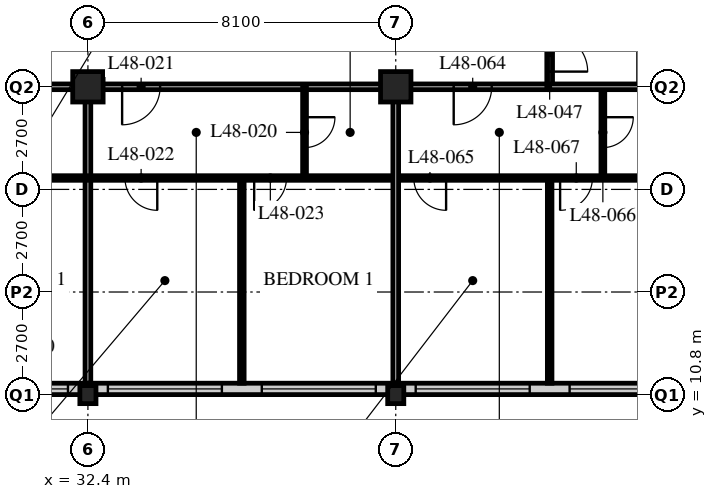
"""IFC4 building model, lengths in metres.
Left out: names, types, materials, properties, quantities, classifications, styles, units other than length and angle.
Written with IfcOpenShell. Run it as: python <this file> out.ifc"""

import sys

from ifc_helpers import new_model, si_unit, direction, frame, frame_2d, origin, origin_2d, place, context, subcontext, project, spatial, rectangle, hollow_rectangle, i_section, extrude, element, fill, save


model = new_model("IFC4")
c1 = context("Model", 3, precision=1e-05, world=origin(), true_north=direction((0.0, 1.0)))
c2 = subcontext(c1, "Body", "Model", "MODEL_VIEW")
j1 = project(units=[si_unit("LENGTHUNIT", "METRE"), si_unit("PLANEANGLEUNIT", "RADIAN")], contexts=[c1])
p1 = place(None, origin())
s1 = spatial("IfcSite", under=j1, at=p1, CompositionType="ELEMENT")
p2 = place(p1, origin())
s2 = spatial("IfcBuilding", under=s1, at=p2, CompositionType="ELEMENT")
p3 = place(p2, frame((0.0, 0.0, 188.4)))
s3 = spatial("IfcBuildingStorey", under=s2, at=p3, CompositionType="ELEMENT", Elevation=188.4)
p4 = place(p3, frame((32.4, 10.8, 0.0), z_axis=(0.0, 0.0, 1.0), x_axis=(1.0, 0.0, 0.0)))
e1 = element("IfcColumn", 1, at=p4, inside=s3, PredefinedType="COLUMN", context=c2, shape_type="SweptSolid", body=[
    extrude(i_section(OverallWidth=0.424, OverallDepth=0.475, WebThickness=0.048, FlangeThickness=0.077, FilletRadius=0.015, at=origin_2d()), origin(), (0.0, 0.0, 1.0), 3.6),
])
p5 = place(p3, frame((32.4, 18.9, 0.0), z_axis=(0.0, 0.0, 1.0), x_axis=(1.0, 0.0, 0.0)))
e2 = element("IfcColumn", 2, at=p5, inside=s3, PredefinedType="COLUMN", context=c2, shape_type="SweptSolid", body=[
    extrude(hollow_rectangle(XDim=0.8, YDim=0.8, WallThickness=0.08, at=origin_2d()), origin(), (0.0, 0.0, 1.0), 3.6),
])
p6 = place(p3, frame((40.5, 10.8, 0.0), z_axis=(0.0, 0.0, 1.0), x_axis=(1.0, 0.0, 0.0)))
e3 = element("IfcColumn", 3, at=p6, inside=s3, PredefinedType="COLUMN", context=c2, shape_type="SweptSolid", body=[
    extrude(i_section(OverallWidth=0.424, OverallDepth=0.475, WebThickness=0.048, FlangeThickness=0.077, FilletRadius=0.015, at=origin_2d()), origin(), (0.0, 0.0, 1.0), 3.6),
])
p7 = place(p3, frame((40.5, 18.9, 0.0), z_axis=(0.0, 0.0, 1.0), x_axis=(1.0, 0.0, 0.0)))
e4 = element("IfcColumn", 4, at=p7, inside=s3, PredefinedType="COLUMN", context=c2, shape_type="SweptSolid", body=[
    extrude(hollow_rectangle(XDim=0.8, YDim=0.8, WallThickness=0.08, at=origin_2d()), origin(), (0.0, 0.0, 1.0), 3.6),
])
p8 = place(p3, frame((8.4, 10.95, 0.0), z_axis=(0.0, 0.0, 1.0), x_axis=(1.0, 0.0, 0.0)))
e5 = element("IfcWall", 5, at=p8, inside=s3, PredefinedType="SOLIDWALL", context=c2, shape_type="SweptSolid", body=[
    extrude(rectangle(XDim=40.2, YDim=0.3, at=frame_2d((20.1, 0.0))), origin(), (0.0, 0.0, 1.0), 3.39),
])
p9 = place(p8, frame((0.225, 0.0, 0.6)))
e6 = element("IfcOpeningElement", 6, at=p9, cuts=e5, PredefinedType="OPENING", context=c2, shape_type="SweptSolid", body=[
    extrude(rectangle(XDim=3.0, YDim=2.4, at=frame_2d((1.5, 1.2))), frame((0.0, 0.16, 0.0), z_axis=(0.0, -1.0, 0.0), x_axis=(1.0, 0.0, 0.0)), (0.0, 0.0, 1.0), 0.32),
])
p10 = place(p8, frame((4.275, 0.0, 0.6)))
e7 = element("IfcOpeningElement", 7, at=p10, cuts=e5, PredefinedType="OPENING", context=c2, shape_type="SweptSolid", body=[
    extrude(rectangle(XDim=3.0, YDim=2.4, at=frame_2d((1.5, 1.2))), frame((0.0, 0.16, 0.0), z_axis=(0.0, -1.0, 0.0), x_axis=(1.0, 0.0, 0.0)), (0.0, 0.0, 1.0), 0.32),
])
p11 = place(p8, frame((8.325, 0.0, 0.6)))
e8 = element("IfcOpeningElement", 8, at=p11, cuts=e5, PredefinedType="OPENING", context=c2, shape_type="SweptSolid", body=[
    extrude(rectangle(XDim=3.0, YDim=2.4, at=frame_2d((1.5, 1.2))), frame((0.0, 0.16, 0.0), z_axis=(0.0, -1.0, 0.0), x_axis=(1.0, 0.0, 0.0)), (0.0, 0.0, 1.0), 0.32),
])
p12 = place(p8, frame((12.375, 0.0, 0.6)))
e9 = element("IfcOpeningElement", 9, at=p12, cuts=e5, PredefinedType="OPENING", context=c2, shape_type="SweptSolid", body=[
    extrude(rectangle(XDim=3.0, YDim=2.4, at=frame_2d((1.5, 1.2))), frame((0.0, 0.16, 0.0), z_axis=(0.0, -1.0, 0.0), x_axis=(1.0, 0.0, 0.0)), (0.0, 0.0, 1.0), 0.32),
])
p13 = place(p8, frame((16.425, 0.0, 0.6)))
e10 = element("IfcOpeningElement", 10, at=p13, cuts=e5, PredefinedType="OPENING", context=c2, shape_type="SweptSolid", body=[
    extrude(rectangle(XDim=3.0, YDim=2.4, at=frame_2d((1.5, 1.2))), frame((0.0, 0.16, 0.0), z_axis=(0.0, -1.0, 0.0), x_axis=(1.0, 0.0, 0.0)), (0.0, 0.0, 1.0), 0.32),
])
p14 = place(p8, frame((20.475, 0.0, 0.6)))
e11 = element("IfcOpeningElement", 11, at=p14, cuts=e5, PredefinedType="OPENING", context=c2, shape_type="SweptSolid", body=[
    extrude(rectangle(XDim=3.0, YDim=2.4, at=frame_2d((1.5, 1.2))), frame((0.0, 0.16, 0.0), z_axis=(0.0, -1.0, 0.0), x_axis=(1.0, 0.0, 0.0)), (0.0, 0.0, 1.0), 0.32),
])
p15 = place(p8, frame((24.525, 0.0, 0.6)))
e12 = element("IfcOpeningElement", 12, at=p15, cuts=e5, PredefinedType="OPENING", context=c2, shape_type="SweptSolid", body=[
    extrude(rectangle(XDim=3.0, YDim=2.4, at=frame_2d((1.5, 1.2))), frame((0.0, 0.16, 0.0), z_axis=(0.0, -1.0, 0.0), x_axis=(1.0, 0.0, 0.0)), (0.0, 0.0, 1.0), 0.32),
])
p16 = place(p8, frame((28.575, 0.0, 0.6)))
e13 = element("IfcOpeningElement", 13, at=p16, cuts=e5, PredefinedType="OPENING", context=c2, shape_type="SweptSolid", body=[
    extrude(rectangle(XDim=3.0, YDim=2.4, at=frame_2d((1.5, 1.2))), frame((0.0, 0.16, 0.0), z_axis=(0.0, -1.0, 0.0), x_axis=(1.0, 0.0, 0.0)), (0.0, 0.0, 1.0), 0.32),
])
p17 = place(p8, frame((32.625, 0.0, 0.6)))
e14 = element("IfcOpeningElement", 14, at=p17, cuts=e5, PredefinedType="OPENING", context=c2, shape_type="SweptSolid", body=[
    extrude(rectangle(XDim=3.0, YDim=2.4, at=frame_2d((1.5, 1.2))), frame((0.0, 0.16, 0.0), z_axis=(0.0, -1.0, 0.0), x_axis=(1.0, 0.0, 0.0)), (0.0, 0.0, 1.0), 0.32),
])
p18 = place(p8, frame((36.675, 0.0, 0.6)))
e15 = element("IfcOpeningElement", 15, at=p18, cuts=e5, PredefinedType="OPENING", context=c2, shape_type="SweptSolid", body=[
    extrude(rectangle(XDim=3.0, YDim=2.4, at=frame_2d((1.5, 1.2))), frame((0.0, 0.16, 0.0), z_axis=(0.0, -1.0, 0.0), x_axis=(1.0, 0.0, 0.0)), (0.0, 0.0, 1.0), 0.32),
])
p19 = place(p3, frame((12.15, 18.9, 0.0), z_axis=(0.0, 0.0, 1.0), x_axis=(1.0, 0.0, 0.0)))
e16 = element("IfcWall", 16, at=p19, inside=s3, PredefinedType="PARTITIONING", context=c2, shape_type="SweptSolid", body=[
    extrude(rectangle(XDim=32.4, YDim=0.15, at=frame_2d((16.2, 0.0))), origin(), (0.0, 0.0, 1.0), 2.778),
])
p20 = place(p19, frame((4.95, 0.0, 0.0)))
e17 = element("IfcOpeningElement", 17, at=p20, cuts=e16, PredefinedType="OPENING", context=c2, shape_type="SweptSolid", body=[
    extrude(rectangle(XDim=1.0, YDim=2.1, at=frame_2d((0.5, 1.05))), frame((0.0, 0.085, 0.0), z_axis=(0.0, -1.0, 0.0), x_axis=(1.0, 0.0, 0.0)), (0.0, 0.0, 1.0), 0.17),
])
p21 = place(p19, frame((13.05, 0.0, 0.0)))
e18 = element("IfcOpeningElement", 18, at=p21, cuts=e16, PredefinedType="OPENING", context=c2, shape_type="SweptSolid", body=[
    extrude(rectangle(XDim=1.0, YDim=2.1, at=frame_2d((0.5, 1.05))), frame((0.0, 0.085, 0.0), z_axis=(0.0, -1.0, 0.0), x_axis=(1.0, 0.0, 0.0)), (0.0, 0.0, 1.0), 0.17),
])
p22 = place(p19, frame((21.15, 0.0, 0.0)))
e19 = element("IfcOpeningElement", 19, at=p22, cuts=e16, PredefinedType="OPENING", context=c2, shape_type="SweptSolid", body=[
    extrude(rectangle(XDim=1.0, YDim=2.1, at=frame_2d((0.5, 1.05))), frame((0.0, 0.085, 0.0), z_axis=(0.0, -1.0, 0.0), x_axis=(1.0, 0.0, 0.0)), (0.0, 0.0, 1.0), 0.17),
])
p23 = place(p19, frame((1.525, 0.0, 0.0)))
e20 = element("IfcOpeningElement", 20, at=p23, cuts=e16, PredefinedType="OPENING", context=c2, shape_type="SweptSolid", body=[
    extrude(rectangle(XDim=1.0, YDim=2.1, at=frame_2d((0.5, 1.05))), frame((0.0, 0.085, 0.0), z_axis=(0.0, -1.0, 0.0), x_axis=(1.0, 0.0, 0.0)), (0.0, 0.0, 1.0), 0.17),
])
p24 = place(p19, frame((29.875, 0.0, 0.0)))
e21 = element("IfcOpeningElement", 21, at=p24, cuts=e16, PredefinedType="OPENING", context=c2, shape_type="SweptSolid", body=[
    extrude(rectangle(XDim=1.0, YDim=2.1, at=frame_2d((0.5, 1.05))), frame((0.0, 0.085, 0.0), z_axis=(0.0, -1.0, 0.0), x_axis=(1.0, 0.0, 0.0)), (0.0, 0.0, 1.0), 0.17),
])
p25 = place(p3, frame((44.55, 18.9, 0.0), z_axis=(0.0, 0.0, 1.0), x_axis=(0.0, 1.0, 0.0)))
e22 = element("IfcWall", 22, at=p25, inside=s3, PredefinedType="PARTITIONING", context=c2, shape_type="SweptSolid", body=[
    extrude(rectangle(XDim=28.35, YDim=0.15, at=frame_2d((14.175, 0.0))), origin(), (0.0, 0.0, 1.0), 3.39),
])
p26 = place(p25, frame((0.4, 0.0, 0.0)))
e23 = element("IfcOpeningElement", 23, at=p26, cuts=e22, PredefinedType="OPENING", context=c2, shape_type="SweptSolid", body=[
    extrude(rectangle(XDim=1.0, YDim=2.1, at=frame_2d((0.5, 1.05))), frame((0.0, 0.085, 0.0), z_axis=(0.0, -1.0, 0.0), x_axis=(1.0, 0.0, 0.0)), (0.0, 0.0, 1.0), 0.17),
])
p27 = place(p25, frame((10.45, 0.0, 0.0)))
e24 = element("IfcOpeningElement", 24, at=p27, cuts=e22, PredefinedType="OPENING", context=c2, shape_type="SweptSolid", body=[
    extrude(rectangle(XDim=1.0, YDim=2.1, at=frame_2d((0.5, 1.05))), frame((0.0, 0.085, 0.0), z_axis=(0.0, -1.0, 0.0), x_axis=(1.0, 0.0, 0.0)), (0.0, 0.0, 1.0), 0.17),
])
p28 = place(p25, frame((14.5, 0.0, 0.0)))
e25 = element("IfcOpeningElement", 25, at=p28, cuts=e22, PredefinedType="OPENING", context=c2, shape_type="SweptSolid", body=[
    extrude(rectangle(XDim=1.0, YDim=2.1, at=frame_2d((0.5, 1.05))), frame((0.0, 0.085, 0.0), z_axis=(0.0, -1.0, 0.0), x_axis=(1.0, 0.0, 0.0)), (0.0, 0.0, 1.0), 0.17),
])
p29 = place(p25, frame((16.6, 0.0, 0.0)))
e26 = element("IfcOpeningElement", 26, at=p29, cuts=e22, PredefinedType="OPENING", context=c2, shape_type="SweptSolid", body=[
    extrude(rectangle(XDim=1.0, YDim=2.1, at=frame_2d((0.5, 1.05))), frame((0.0, 0.085, 0.0), z_axis=(0.0, -1.0, 0.0), x_axis=(1.0, 0.0, 0.0)), (0.0, 0.0, 1.0), 0.17),
])
p30 = place(p25, frame((26.65, 0.0, 0.0)))
e27 = element("IfcOpeningElement", 27, at=p30, cuts=e22, PredefinedType="OPENING", context=c2, shape_type="SweptSolid", body=[
    extrude(rectangle(XDim=1.0, YDim=2.1, at=frame_2d((0.5, 1.05))), frame((0.0, 0.085, 0.0), z_axis=(0.0, -1.0, 0.0), x_axis=(1.0, 0.0, 0.0)), (0.0, 0.0, 1.0), 0.17),
])
p31 = place(p3, frame((32.4, 18.9, 0.0), z_axis=(0.0, 0.0, 1.0), x_axis=(0.0, -1.0, 0.0)))
e28 = element("IfcWall", 28, at=p31, inside=s3, PredefinedType="PARTITIONING", context=c2, shape_type="SweptSolid", body=[
    extrude(rectangle(XDim=7.8, YDim=0.15, at=frame_2d((3.9, 0.0))), origin(), (0.0, 0.0, 1.0), 2.778),
])
p32 = place(p3, frame((38.1, 18.9, 0.0), z_axis=(0.0, 0.0, 1.0), x_axis=(0.0, -1.0, 0.0)))
e29 = element("IfcWall", 29, at=p32, inside=s3, PredefinedType="PARTITIONING", context=c2, shape_type="SweptSolid", body=[
    extrude(rectangle(XDim=2.4, YDim=0.1, at=frame_2d((1.2, 0.0))), origin(), (0.0, 0.0, 1.0), 3.39),
])
p33 = place(p32, frame((0.8, 0.0, 0.0)))
e30 = element("IfcOpeningElement", 30, at=p33, cuts=e29, PredefinedType="OPENING", context=c2, shape_type="SweptSolid", body=[
    extrude(rectangle(XDim=0.8, YDim=2.1, at=frame_2d((0.4, 1.05))), frame((0.0, 0.06, 0.0), z_axis=(0.0, -1.0, 0.0), x_axis=(1.0, 0.0, 0.0)), (0.0, 0.0, 1.0), 0.12),
])
p34 = place(p3, frame((36.45, 16.5, 0.0), z_axis=(0.0, 0.0, 1.0), x_axis=(0.0, -1.0, 0.0)))
e31 = element("IfcWall", 31, at=p34, inside=s3, PredefinedType="PARTITIONING", context=c2, shape_type="SweptSolid", body=[
    extrude(rectangle(XDim=5.4, YDim=0.12, at=frame_2d((2.7, 0.0))), origin(), (0.0, 0.0, 1.0), 3.39),
])
p35 = place(p3, frame((8.15, 16.5, 0.0), z_axis=(0.0, 0.0, 1.0), x_axis=(1.0, 0.0, 0.0)))
e32 = element("IfcWall", 32, at=p35, inside=s3, PredefinedType="PARTITIONING", context=c2, shape_type="SweptSolid", body=[
    extrude(rectangle(XDim=40.4, YDim=0.12, at=frame_2d((20.2, 0.0))), origin(), (0.0, 0.0, 1.0), 3.39),
])
p36 = place(p35, frame((9.025, 0.0, 0.0)))
e33 = element("IfcOpeningElement", 33, at=p36, cuts=e32, PredefinedType="OPENING", context=c2, shape_type="SweptSolid", body=[
    extrude(rectangle(XDim=0.85, YDim=2.1, at=frame_2d((0.425, 1.05))), frame((0.0, 0.07, 0.0), z_axis=(0.0, -1.0, 0.0), x_axis=(1.0, 0.0, 0.0)), (0.0, 0.0, 1.0), 0.14),
])
p37 = place(p35, frame((12.425, 0.0, 0.0)))
e34 = element("IfcOpeningElement", 34, at=p37, cuts=e32, PredefinedType="OPENING", context=c2, shape_type="SweptSolid", body=[
    extrude(rectangle(XDim=0.85, YDim=2.1, at=frame_2d((0.425, 1.05))), frame((0.0, 0.07, 0.0), z_axis=(0.0, -1.0, 0.0), x_axis=(1.0, 0.0, 0.0)), (0.0, 0.0, 1.0), 0.14),
])
p38 = place(p35, frame((17.125, 0.0, 0.0)))
e35 = element("IfcOpeningElement", 35, at=p38, cuts=e32, PredefinedType="OPENING", context=c2, shape_type="SweptSolid", body=[
    extrude(rectangle(XDim=0.85, YDim=2.1, at=frame_2d((0.425, 1.05))), frame((0.0, 0.07, 0.0), z_axis=(0.0, -1.0, 0.0), x_axis=(1.0, 0.0, 0.0)), (0.0, 0.0, 1.0), 0.14),
])
p39 = place(p35, frame((20.525, 0.0, 0.0)))
e36 = element("IfcOpeningElement", 36, at=p39, cuts=e32, PredefinedType="OPENING", context=c2, shape_type="SweptSolid", body=[
    extrude(rectangle(XDim=0.85, YDim=2.1, at=frame_2d((0.425, 1.05))), frame((0.0, 0.07, 0.0), z_axis=(0.0, -1.0, 0.0), x_axis=(1.0, 0.0, 0.0)), (0.0, 0.0, 1.0), 0.14),
])
p40 = place(p35, frame((25.225, 0.0, 0.0)))
e37 = element("IfcOpeningElement", 37, at=p40, cuts=e32, PredefinedType="OPENING", context=c2, shape_type="SweptSolid", body=[
    extrude(rectangle(XDim=0.85, YDim=2.1, at=frame_2d((0.425, 1.05))), frame((0.0, 0.07, 0.0), z_axis=(0.0, -1.0, 0.0), x_axis=(1.0, 0.0, 0.0)), (0.0, 0.0, 1.0), 0.14),
])
p41 = place(p35, frame((28.625, 0.0, 0.0)))
e38 = element("IfcOpeningElement", 38, at=p41, cuts=e32, PredefinedType="OPENING", context=c2, shape_type="SweptSolid", body=[
    extrude(rectangle(XDim=0.85, YDim=2.1, at=frame_2d((0.425, 1.05))), frame((0.0, 0.07, 0.0), z_axis=(0.0, -1.0, 0.0), x_axis=(1.0, 0.0, 0.0)), (0.0, 0.0, 1.0), 0.14),
])
p42 = place(p35, frame((6.725, 0.0, 0.0)))
e39 = element("IfcOpeningElement", 39, at=p42, cuts=e32, PredefinedType="OPENING", context=c2, shape_type="SweptSolid", body=[
    extrude(rectangle(XDim=0.85, YDim=2.1, at=frame_2d((0.425, 1.05))), frame((0.0, 0.07, 0.0), z_axis=(0.0, -1.0, 0.0), x_axis=(1.0, 0.0, 0.0)), (0.0, 0.0, 1.0), 0.14),
])
p43 = place(p35, frame((2.875, 0.0, 0.0)))
e40 = element("IfcOpeningElement", 40, at=p43, cuts=e32, PredefinedType="OPENING", context=c2, shape_type="SweptSolid", body=[
    extrude(rectangle(XDim=0.85, YDim=2.1, at=frame_2d((0.425, 1.05))), frame((0.0, 0.07, 0.0), z_axis=(0.0, -1.0, 0.0), x_axis=(1.0, 0.0, 0.0)), (0.0, 0.0, 1.0), 0.14),
])
p44 = place(p35, frame((32.825, 0.0, 0.0)))
e41 = element("IfcOpeningElement", 41, at=p44, cuts=e32, PredefinedType="OPENING", context=c2, shape_type="SweptSolid", body=[
    extrude(rectangle(XDim=0.85, YDim=2.1, at=frame_2d((0.425, 1.05))), frame((0.0, 0.07, 0.0), z_axis=(0.0, -1.0, 0.0), x_axis=(1.0, 0.0, 0.0)), (0.0, 0.0, 1.0), 0.14),
])
p45 = place(p35, frame((36.675, 0.0, 0.0)))
e42 = element("IfcOpeningElement", 42, at=p45, cuts=e32, PredefinedType="OPENING", context=c2, shape_type="SweptSolid", body=[
    extrude(rectangle(XDim=0.85, YDim=2.1, at=frame_2d((0.425, 1.05))), frame((0.0, 0.07, 0.0), z_axis=(0.0, -1.0, 0.0), x_axis=(1.0, 0.0, 0.0)), (0.0, 0.0, 1.0), 0.14),
])
p46 = place(p3, frame((45.95, 18.9, 0.0), z_axis=(0.0, 0.0, 1.0), x_axis=(0.0, -1.0, 0.0)))
e43 = element("IfcWall", 43, at=p46, inside=s3, PredefinedType="PARTITIONING", context=c2, shape_type="SweptSolid", body=[
    extrude(rectangle(XDim=2.4, YDim=0.1, at=frame_2d((1.2, 0.0))), origin(), (0.0, 0.0, 1.0), 3.39),
])
p47 = place(p46, frame((0.8, 0.0, 0.0)))
e44 = element("IfcOpeningElement", 44, at=p47, cuts=e43, PredefinedType="OPENING", context=c2, shape_type="SweptSolid", body=[
    extrude(rectangle(XDim=0.8, YDim=2.1, at=frame_2d((0.4, 1.05))), frame((0.0, 0.06, 0.0), z_axis=(0.0, -1.0, 0.0), x_axis=(1.0, 0.0, 0.0)), (0.0, 0.0, 1.0), 0.12),
])
p48 = place(p3, frame((44.55, 16.5, 0.0), z_axis=(0.0, 0.0, 1.0), x_axis=(0.0, -1.0, 0.0)))
e45 = element("IfcWall", 45, at=p48, inside=s3, PredefinedType="PARTITIONING", context=c2, shape_type="SweptSolid", body=[
    extrude(rectangle(XDim=5.4, YDim=0.12, at=frame_2d((2.7, 0.0))), origin(), (0.0, 0.0, 1.0), 3.39),
])
p49 = place(p3, frame((44.55, 18.9, 0.0), z_axis=(0.0, 0.0, 1.0), x_axis=(1.0, 0.0, 0.0)))
e46 = element("IfcWall", 46, at=p49, inside=s3, PredefinedType="PARTITIONING", context=c2, shape_type="SweptSolid", body=[
    extrude(rectangle(XDim=7.8, YDim=0.15, at=frame_2d((3.9, 0.0))), origin(), (0.0, 0.0, 1.0), 2.778),
])
p50 = place(p3, frame((40.5, 18.9, 0.0), z_axis=(0.0, 0.0, 1.0), x_axis=(0.0, -1.0, 0.0)))
e47 = element("IfcWall", 47, at=p50, inside=s3, PredefinedType="PARTITIONING", context=c2, shape_type="SweptSolid", body=[
    extrude(rectangle(XDim=7.8, YDim=0.15, at=frame_2d((3.9, 0.0))), origin(), (0.0, 0.0, 1.0), 2.778),
])
p51 = place(p14, origin())
e48 = element("IfcWindow", 48, at=p51, inside=s3, PartitioningType="SINGLE_PANEL", PredefinedType="WINDOW", context=c2, shape_type="SweptSolid", body=[
    extrude(rectangle(XDim=3.0, YDim=2.4, at=frame_2d((1.5, 1.2))), frame((0.0, 0.03, 0.0), z_axis=(0.0, -1.0, 0.0), x_axis=(1.0, 0.0, 0.0)), (0.0, 0.0, 1.0), 0.06),
])
fill(e11, e48)
p52 = place(p15, origin())
e49 = element("IfcWindow", 49, at=p52, inside=s3, PartitioningType="SINGLE_PANEL", PredefinedType="WINDOW", context=c2, shape_type="SweptSolid", body=[
    extrude(rectangle(XDim=3.0, YDim=2.4, at=frame_2d((1.5, 1.2))), frame((0.0, 0.03, 0.0), z_axis=(0.0, -1.0, 0.0), x_axis=(1.0, 0.0, 0.0)), (0.0, 0.0, 1.0), 0.06),
])
fill(e12, e49)
p53 = place(p16, origin())
e50 = element("IfcWindow", 50, at=p53, inside=s3, PartitioningType="SINGLE_PANEL", PredefinedType="WINDOW", context=c2, shape_type="SweptSolid", body=[
    extrude(rectangle(XDim=3.0, YDim=2.4, at=frame_2d((1.5, 1.2))), frame((0.0, 0.03, 0.0), z_axis=(0.0, -1.0, 0.0), x_axis=(1.0, 0.0, 0.0)), (0.0, 0.0, 1.0), 0.06),
])
fill(e13, e50)
p54 = place(p17, origin())
e51 = element("IfcWindow", 51, at=p54, inside=s3, PartitioningType="SINGLE_PANEL", PredefinedType="WINDOW", context=c2, shape_type="SweptSolid", body=[
    extrude(rectangle(XDim=3.0, YDim=2.4, at=frame_2d((1.5, 1.2))), frame((0.0, 0.03, 0.0), z_axis=(0.0, -1.0, 0.0), x_axis=(1.0, 0.0, 0.0)), (0.0, 0.0, 1.0), 0.06),
])
fill(e14, e51)
p55 = place(p18, origin())
e52 = element("IfcWindow", 52, at=p55, inside=s3, PartitioningType="SINGLE_PANEL", PredefinedType="WINDOW", context=c2, shape_type="SweptSolid", body=[
    extrude(rectangle(XDim=3.0, YDim=2.4, at=frame_2d((1.5, 1.2))), frame((0.0, 0.03, 0.0), z_axis=(0.0, -1.0, 0.0), x_axis=(1.0, 0.0, 0.0)), (0.0, 0.0, 1.0), 0.06),
])
fill(e15, e52)
p56 = place(p33, origin())
e53 = element("IfcDoor", 53, at=p56, inside=s3, OperationType="SINGLE_SWING_LEFT", PredefinedType="DOOR", context=c2, shape_type="SweptSolid", body=[
    extrude(rectangle(XDim=0.8, YDim=2.1, at=frame_2d((0.4, 1.05))), frame((0.0, 0.025, 0.0), z_axis=(0.0, -1.0, 0.0), x_axis=(1.0, 0.0, 0.0)), (0.0, 0.0, 1.0), 0.05),
])
fill(e30, e53)
p57 = place(p22, origin())
e54 = element("IfcDoor", 54, at=p57, inside=s3, OperationType="SINGLE_SWING_RIGHT", PredefinedType="DOOR", context=c2, shape_type="SweptSolid", body=[
    extrude(rectangle(XDim=1.0, YDim=2.1, at=frame_2d((0.5, 1.05))), frame((0.0, 0.025, 0.0), z_axis=(0.0, -1.0, 0.0), x_axis=(1.0, 0.0, 0.0)), (0.0, 0.0, 1.0), 0.05),
])
fill(e19, e54)
p58 = place(p40, origin())
e55 = element("IfcDoor", 55, at=p58, inside=s3, OperationType="SINGLE_SWING_LEFT", PredefinedType="DOOR", context=c2, shape_type="SweptSolid", body=[
    extrude(rectangle(XDim=0.85, YDim=2.1, at=frame_2d((0.425, 1.05))), frame((0.0, 0.025, 0.0), z_axis=(0.0, -1.0, 0.0), x_axis=(1.0, 0.0, 0.0)), (0.0, 0.0, 1.0), 0.05),
])
fill(e37, e55)
p59 = place(p41, origin())
e56 = element("IfcDoor", 56, at=p59, inside=s3, OperationType="SINGLE_SWING_RIGHT", PredefinedType="DOOR", context=c2, shape_type="SweptSolid", body=[
    extrude(rectangle(XDim=0.85, YDim=2.1, at=frame_2d((0.425, 1.05))), frame((0.0, 0.025, 0.0), z_axis=(0.0, -1.0, 0.0), x_axis=(1.0, 0.0, 0.0)), (0.0, 0.0, 1.0), 0.05),
])
fill(e38, e56)
p60 = place(p26, origin())
e57 = element("IfcDoor", 57, at=p60, inside=s3, OperationType="SINGLE_SWING_RIGHT", PredefinedType="DOOR", context=c2, shape_type="SweptSolid", body=[
    extrude(rectangle(XDim=1.0, YDim=2.1, at=frame_2d((0.5, 1.05))), frame((0.0, 0.025, 0.0), z_axis=(0.0, -1.0, 0.0), x_axis=(1.0, 0.0, 0.0)), (0.0, 0.0, 1.0), 0.05),
])
fill(e23, e57)
p61 = place(p24, origin())
e58 = element("IfcDoor", 58, at=p61, inside=s3, OperationType="SINGLE_SWING_RIGHT", PredefinedType="DOOR", context=c2, shape_type="SweptSolid", body=[
    extrude(rectangle(XDim=1.0, YDim=2.1, at=frame_2d((0.5, 1.05))), frame((0.0, 0.025, 0.0), z_axis=(0.0, -1.0, 0.0), x_axis=(1.0, 0.0, 0.0)), (0.0, 0.0, 1.0), 0.05),
])
fill(e21, e58)
p62 = place(p44, origin())
e59 = element("IfcDoor", 59, at=p62, inside=s3, OperationType="SINGLE_SWING_LEFT", PredefinedType="DOOR", context=c2, shape_type="SweptSolid", body=[
    extrude(rectangle(XDim=0.85, YDim=2.1, at=frame_2d((0.425, 1.05))), frame((0.0, 0.025, 0.0), z_axis=(0.0, -1.0, 0.0), x_axis=(1.0, 0.0, 0.0)), (0.0, 0.0, 1.0), 0.05),
])
fill(e41, e59)
p63 = place(p47, origin())
e60 = element("IfcDoor", 60, at=p63, inside=s3, OperationType="SINGLE_SWING_LEFT", PredefinedType="DOOR", context=c2, shape_type="SweptSolid", body=[
    extrude(rectangle(XDim=0.8, YDim=2.1, at=frame_2d((0.4, 1.05))), frame((0.0, 0.025, 0.0), z_axis=(0.0, -1.0, 0.0), x_axis=(1.0, 0.0, 0.0)), (0.0, 0.0, 1.0), 0.05),
])
fill(e44, e60)
p64 = place(p45, origin())
e61 = element("IfcDoor", 61, at=p64, inside=s3, OperationType="SINGLE_SWING_RIGHT", PredefinedType="DOOR", context=c2, shape_type="SweptSolid", body=[
    extrude(rectangle(XDim=0.85, YDim=2.1, at=frame_2d((0.425, 1.05))), frame((0.0, 0.025, 0.0), z_axis=(0.0, -1.0, 0.0), x_axis=(1.0, 0.0, 0.0)), (0.0, 0.0, 1.0), 0.05),
])
fill(e42, e61)
save(model, sys.argv[1])
